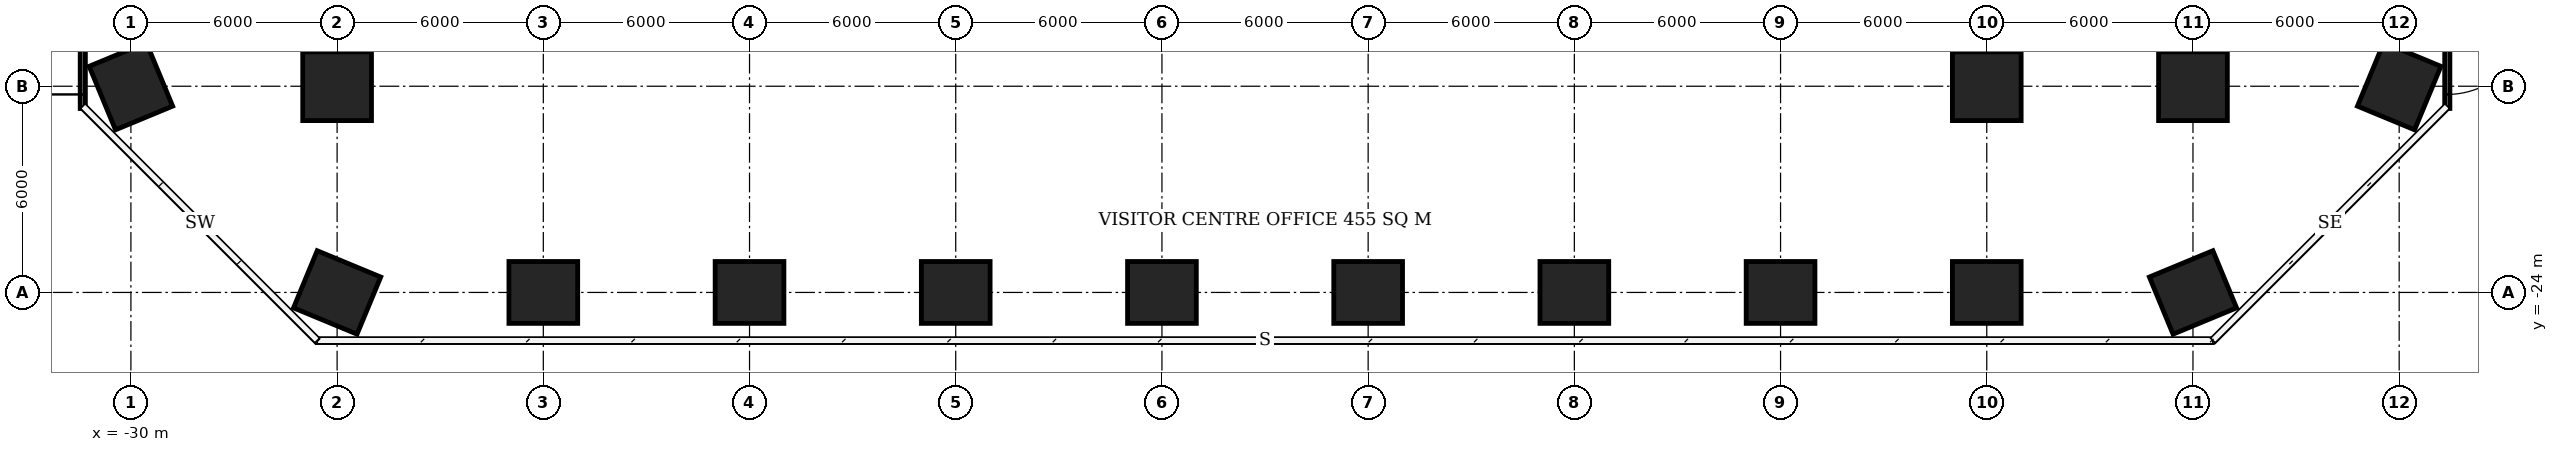
"""IFC4 building model, lengths in metres.
Left out: names, types, materials, properties, quantities, classifications, styles, units other than length and angle.
Written with IfcOpenShell. Run it as: python <this file> out.ifc"""

import sys

from ifc_helpers import new_model, si_unit, direction, frame, frame_2d, origin, origin_2d, place, context, subcontext, project, spatial, rectangle, extrude, element, fill, save


model = new_model("IFC4")
c1 = context("Model", 3, precision=1e-05, world=origin(), true_north=direction((0.0, 1.0)))
c2 = subcontext(c1, "Body", "Model", "MODEL_VIEW")
j1 = project(units=[si_unit("LENGTHUNIT", "METRE"), si_unit("PLANEANGLEUNIT", "RADIAN")], contexts=[c1])
p1 = place(None, origin())
s1 = spatial("IfcSite", under=j1, at=p1, CompositionType="ELEMENT")
p2 = place(p1, origin())
s2 = spatial("IfcBuilding", under=s1, at=p2, CompositionType="ELEMENT")
p3 = place(p2, origin())
s3 = spatial("IfcBuildingStorey", under=s2, at=p3, CompositionType="ELEMENT", Elevation=0.0)
for number, where, z_axis, x_axis in (
    (1, (-30.0, -18.0, -0.45), (0.0, 0.0, 1.0), (-0.383, 0.924, 0.0)),
    (2, (-24.0, -24.0, -0.45), (0.0, 0.0, 1.0), (-0.924, 0.383, 0.0)),
):
    element("IfcColumn", number, at=place(p3, frame(where, z_axis=z_axis, x_axis=x_axis)), inside=s3, PredefinedType="COLUMN", context=c2, shape_type="SweptSolid", body=[
        extrude(rectangle(XDim=2.0, YDim=1.8, at=origin_2d()), origin(), (0.0, 0.0, 1.0), 6.45),
    ])
p4 = place(p3, frame((-24.0, -18.0, -0.45), z_axis=(0.0, 0.0, 1.0), x_axis=(1.0, 0.0, 0.0)))
e3 = element("IfcColumn", 3, at=p4, inside=s3, PredefinedType="COLUMN", context=c2, shape_type="SweptSolid", body=[
    extrude(rectangle(XDim=2.0, YDim=2.0, at=origin_2d()), origin(), (0.0, 0.0, 1.0), 6.45),
])
for number, where, z_axis, x_axis in (
    (4, (-18.0, -24.0, 0.0), (0.0, 0.0, 1.0), (1.0, 0.0, 0.0)),
    (5, (-12.0, -24.0, 0.0), (0.0, 0.0, 1.0), (1.0, 0.0, 0.0)),
    (6, (-6.0, -24.0, 0.0), (0.0, 0.0, 1.0), (1.0, 0.0, 0.0)),
    (7, (0.0, -24.0, 0.0), (0.0, 0.0, 1.0), (1.0, 0.0, 0.0)),
    (8, (6.0, -24.0, 0.0), (0.0, 0.0, 1.0), (1.0, 0.0, 0.0)),
    (9, (12.0, -24.0, 0.0), (0.0, 0.0, 1.0), (1.0, 0.0, 0.0)),
    (10, (18.0, -24.0, 0.0), (0.0, 0.0, 1.0), (1.0, 0.0, 0.0)),
):
    element("IfcColumn", number, at=place(p3, frame(where, z_axis=z_axis, x_axis=x_axis)), inside=s3, PredefinedType="COLUMN", context=c2, shape_type="SweptSolid", body=[
        extrude(rectangle(XDim=2.0, YDim=1.8, at=origin_2d()), origin(), (0.0, 0.0, 1.0), 6.0),
    ])
p5 = place(p3, frame((24.0, -24.0, -0.45), z_axis=(0.0, 0.0, 1.0), x_axis=(1.0, 0.0, 0.0)))
e11 = element("IfcColumn", 11, at=p5, inside=s3, PredefinedType="COLUMN", context=c2, shape_type="SweptSolid", body=[
    extrude(rectangle(XDim=2.0, YDim=1.8, at=origin_2d()), origin(), (0.0, 0.0, 1.0), 6.45),
])
p6 = place(p3, frame((24.0, -18.0, -0.45), z_axis=(0.0, 0.0, 1.0), x_axis=(1.0, 0.0, 0.0)))
e12 = element("IfcColumn", 12, at=p6, inside=s3, PredefinedType="COLUMN", context=c2, shape_type="SweptSolid", body=[
    extrude(rectangle(XDim=2.0, YDim=2.0, at=origin_2d()), origin(), (0.0, 0.0, 1.0), 6.45),
])
p7 = place(p3, frame((30.0, -24.0, 0.0), z_axis=(0.0, 0.0, 1.0), x_axis=(-0.923879532511, -0.382683432365, 0.0)))
e13 = element("IfcColumn", 13, at=p7, inside=s3, PredefinedType="COLUMN", context=c2, shape_type="SweptSolid", body=[
    extrude(rectangle(XDim=2.0, YDim=1.8, at=origin_2d()), origin(), (0.0, 0.0, 1.0), 6.0),
])
p8 = place(p3, frame((30.0, -18.0, -0.45), z_axis=(0.0, 0.0, 1.0), x_axis=(1.0, 0.0, 0.0)))
e14 = element("IfcColumn", 14, at=p8, inside=s3, PredefinedType="COLUMN", context=c2, shape_type="SweptSolid", body=[
    extrude(rectangle(XDim=2.0, YDim=2.0, at=origin_2d()), origin(), (0.0, 0.0, 1.0), 6.45),
])
p9 = place(p3, frame((36.0, -18.0, -0.45), z_axis=(0.0, 0.0, 1.0), x_axis=(-0.382683432365, -0.923879532511, 0.0)))
e15 = element("IfcColumn", 15, at=p9, inside=s3, PredefinedType="COLUMN", context=c2, shape_type="SweptSolid", body=[
    extrude(rectangle(XDim=2.0, YDim=1.8, at=origin_2d()), origin(), (0.0, 0.0, 1.0), 6.45),
])
p10 = place(p3, frame((37.4, -15.455, 0.0), z_axis=(0.0, 0.0, 1.0), x_axis=(0.0, -1.0, 0.0)))
e16 = element("IfcWall", 16, at=p10, inside=s3, PredefinedType="USERDEFINED", context=c2, shape_type="SweptSolid", body=[
    extrude(rectangle(XDim=3.193, YDim=0.15, at=frame_2d((1.596, 0.0))), origin(), (0.0, 0.0, 1.0), 6.0),
])
p11 = place(p10, frame((0.384, 0.0, 0.0)))
e17 = element("IfcOpeningElement", 17, at=p11, cuts=e16, PredefinedType="OPENING", context=c2, shape_type="SweptSolid", body=[
    extrude(rectangle(XDim=2.4, YDim=2.7, at=frame_2d((1.2, 1.35))), frame((0.0, 0.085, 0.0), z_axis=(0.0, -1.0, 0.0), x_axis=(1.0, 0.0, 0.0)), (0.0, 0.0, 1.0), 0.17),
])
p12 = place(p3, frame((-31.4, -18.647, 0.0), z_axis=(0.0, 0.0, 1.0), x_axis=(0.0, 1.0, 0.0)))
e18 = element("IfcWall", 18, at=p12, inside=s3, PredefinedType="USERDEFINED", context=c2, shape_type="SweptSolid", body=[
    extrude(rectangle(XDim=3.193, YDim=0.15, at=frame_2d((1.596, 0.0))), origin(), (0.0, 0.0, 1.0), 6.0),
])
p13 = place(p12, frame((0.409, 0.0, 0.0)))
e19 = element("IfcOpeningElement", 19, at=p13, cuts=e18, PredefinedType="OPENING", context=c2, shape_type="SweptSolid", body=[
    extrude(rectangle(XDim=2.4, YDim=2.7, at=frame_2d((1.2, 1.35))), frame((0.0, 0.085, 0.0), z_axis=(0.0, -1.0, 0.0), x_axis=(1.0, 0.0, 0.0)), (0.0, 0.0, 1.0), 0.17),
])
p14 = place(p11, origin())
e20 = element("IfcDoor", 20, at=p14, inside=s3, OperationType="DOUBLE_DOOR_SINGLE_SWING", PredefinedType="DOOR", context=c2, shape_type="SweptSolid", body=[
    extrude(rectangle(XDim=2.4, YDim=2.7, at=frame_2d((1.2, 1.35))), frame((0.0, 0.025, 0.0), z_axis=(0.0, -1.0, 0.0), x_axis=(1.0, 0.0, 0.0)), (0.0, 0.0, 1.0), 0.05),
])
fill(e17, e20)
p15 = place(p13, origin())
e21 = element("IfcDoor", 21, at=p15, inside=s3, OperationType="DOUBLE_DOOR_SINGLE_SWING", PredefinedType="DOOR", context=c2, shape_type="SweptSolid", body=[
    extrude(rectangle(XDim=2.4, YDim=2.7, at=frame_2d((1.2, 1.35))), frame((0.0, 0.025, 0.0), z_axis=(0.0, -1.0, 0.0), x_axis=(1.0, 0.0, 0.0)), (0.0, 0.0, 1.0), 0.05),
])
fill(e19, e21)
save(model, sys.argv[1])
